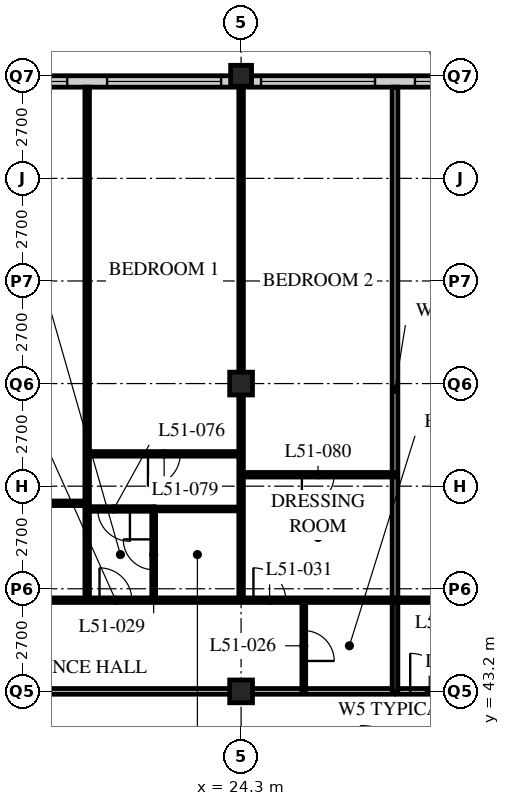
"""IFC4 building model, lengths in metres.
Left out: names, types, materials, properties, quantities, classifications, styles, units other than length and angle.
Written with IfcOpenShell. Run it as: python <this file> out.ifc"""

import sys

from ifc_helpers import new_model, si_unit, direction, frame, frame_2d, origin, origin_2d, place, context, subcontext, project, spatial, rectangle, hollow_rectangle, extrude, element, fill, save


model = new_model("IFC4")
c1 = context("Model", 3, precision=1e-05, world=origin(), true_north=direction((0.0, 1.0)))
c2 = subcontext(c1, "Body", "Model", "MODEL_VIEW")
j1 = project(units=[si_unit("LENGTHUNIT", "METRE"), si_unit("PLANEANGLEUNIT", "RADIAN")], contexts=[c1])
p1 = place(None, origin())
s1 = spatial("IfcSite", under=j1, at=p1, CompositionType="ELEMENT")
p2 = place(p1, origin())
s2 = spatial("IfcBuilding", under=s1, at=p2, CompositionType="ELEMENT")
p3 = place(p2, frame((0.0, 0.0, 199.2)))
s3 = spatial("IfcBuildingStorey", under=s2, at=p3, CompositionType="ELEMENT", Elevation=199.2)
for number, where, z_axis, x_axis in (
    (1, (24.3, 43.2, 0.0), (0.0, 0.0, 1.0), (1.0, 0.0, 0.0)),
    (2, (24.3, 51.3, 0.0), (0.0, 0.0, 1.0), (1.0, 0.0, 0.0)),
):
    element("IfcColumn", number, at=place(p3, frame(where, z_axis=z_axis, x_axis=x_axis)), inside=s3, PredefinedType="COLUMN", context=c2, shape_type="SweptSolid", body=[
        extrude(hollow_rectangle(XDim=0.6, YDim=0.6, WallThickness=0.05, at=origin_2d()), origin(), (0.0, 0.0, 1.0), 3.6),
    ])
p4 = place(p3, frame((24.3, 59.4, 0.0), z_axis=(0.0, 0.0, 1.0), x_axis=(1.0, 0.0, 0.0)))
e3 = element("IfcColumn", 3, at=p4, inside=s3, PredefinedType="COLUMN", context=c2, shape_type="SweptSolid", body=[
    extrude(hollow_rectangle(XDim=0.55, YDim=0.55, WallThickness=0.045, at=origin_2d()), origin(), (0.0, 0.0, 1.0), 3.6),
])
p5 = place(p3, frame((48.3, 59.25, 0.0), z_axis=(0.0, 0.0, 1.0), x_axis=(-1.0, 0.0, 0.0)))
e4 = element("IfcWall", 4, at=p5, inside=s3, PredefinedType="SOLIDWALL", context=c2, shape_type="SweptSolid", body=[
    extrude(rectangle(XDim=40.2, YDim=0.3, at=frame_2d((20.1, 0.0))), origin(), (0.0, 0.0, 1.0), 3.39),
])
p6 = place(p5, frame((0.225, 0.0, 0.6)))
e5 = element("IfcOpeningElement", 5, at=p6, cuts=e4, PredefinedType="OPENING", context=c2, shape_type="SweptSolid", body=[
    extrude(rectangle(XDim=3.0, YDim=2.4, at=frame_2d((1.5, 1.2))), frame((0.0, 0.16, 0.0), z_axis=(0.0, -1.0, 0.0), x_axis=(1.0, 0.0, 0.0)), (0.0, 0.0, 1.0), 0.32),
])
p7 = place(p5, frame((4.275, 0.0, 0.6)))
e6 = element("IfcOpeningElement", 6, at=p7, cuts=e4, PredefinedType="OPENING", context=c2, shape_type="SweptSolid", body=[
    extrude(rectangle(XDim=3.0, YDim=2.4, at=frame_2d((1.5, 1.2))), frame((0.0, 0.16, 0.0), z_axis=(0.0, -1.0, 0.0), x_axis=(1.0, 0.0, 0.0)), (0.0, 0.0, 1.0), 0.32),
])
p8 = place(p5, frame((8.325, 0.0, 0.6)))
e7 = element("IfcOpeningElement", 7, at=p8, cuts=e4, PredefinedType="OPENING", context=c2, shape_type="SweptSolid", body=[
    extrude(rectangle(XDim=3.0, YDim=2.4, at=frame_2d((1.5, 1.2))), frame((0.0, 0.16, 0.0), z_axis=(0.0, -1.0, 0.0), x_axis=(1.0, 0.0, 0.0)), (0.0, 0.0, 1.0), 0.32),
])
p9 = place(p5, frame((12.375, 0.0, 0.6)))
e8 = element("IfcOpeningElement", 8, at=p9, cuts=e4, PredefinedType="OPENING", context=c2, shape_type="SweptSolid", body=[
    extrude(rectangle(XDim=3.0, YDim=2.4, at=frame_2d((1.5, 1.2))), frame((0.0, 0.16, 0.0), z_axis=(0.0, -1.0, 0.0), x_axis=(1.0, 0.0, 0.0)), (0.0, 0.0, 1.0), 0.32),
])
p10 = place(p5, frame((16.425, 0.0, 0.6)))
e9 = element("IfcOpeningElement", 9, at=p10, cuts=e4, PredefinedType="OPENING", context=c2, shape_type="SweptSolid", body=[
    extrude(rectangle(XDim=3.0, YDim=2.4, at=frame_2d((1.5, 1.2))), frame((0.0, 0.16, 0.0), z_axis=(0.0, -1.0, 0.0), x_axis=(1.0, 0.0, 0.0)), (0.0, 0.0, 1.0), 0.32),
])
p11 = place(p5, frame((20.475, 0.0, 0.6)))
e10 = element("IfcOpeningElement", 10, at=p11, cuts=e4, PredefinedType="OPENING", context=c2, shape_type="SweptSolid", body=[
    extrude(rectangle(XDim=3.0, YDim=2.4, at=frame_2d((1.5, 1.2))), frame((0.0, 0.16, 0.0), z_axis=(0.0, -1.0, 0.0), x_axis=(1.0, 0.0, 0.0)), (0.0, 0.0, 1.0), 0.32),
])
p12 = place(p5, frame((24.525, 0.0, 0.6)))
e11 = element("IfcOpeningElement", 11, at=p12, cuts=e4, PredefinedType="OPENING", context=c2, shape_type="SweptSolid", body=[
    extrude(rectangle(XDim=3.0, YDim=2.4, at=frame_2d((1.5, 1.2))), frame((0.0, 0.16, 0.0), z_axis=(0.0, -1.0, 0.0), x_axis=(1.0, 0.0, 0.0)), (0.0, 0.0, 1.0), 0.32),
])
p13 = place(p5, frame((28.575, 0.0, 0.6)))
e12 = element("IfcOpeningElement", 12, at=p13, cuts=e4, PredefinedType="OPENING", context=c2, shape_type="SweptSolid", body=[
    extrude(rectangle(XDim=3.0, YDim=2.4, at=frame_2d((1.5, 1.2))), frame((0.0, 0.16, 0.0), z_axis=(0.0, -1.0, 0.0), x_axis=(1.0, 0.0, 0.0)), (0.0, 0.0, 1.0), 0.32),
])
p14 = place(p5, frame((32.625, 0.0, 0.6)))
e13 = element("IfcOpeningElement", 13, at=p14, cuts=e4, PredefinedType="OPENING", context=c2, shape_type="SweptSolid", body=[
    extrude(rectangle(XDim=3.0, YDim=2.4, at=frame_2d((1.5, 1.2))), frame((0.0, 0.16, 0.0), z_axis=(0.0, -1.0, 0.0), x_axis=(1.0, 0.0, 0.0)), (0.0, 0.0, 1.0), 0.32),
])
p15 = place(p5, frame((36.675, 0.0, 0.6)))
e14 = element("IfcOpeningElement", 14, at=p15, cuts=e4, PredefinedType="OPENING", context=c2, shape_type="SweptSolid", body=[
    extrude(rectangle(XDim=3.0, YDim=2.4, at=frame_2d((1.5, 1.2))), frame((0.0, 0.16, 0.0), z_axis=(0.0, -1.0, 0.0), x_axis=(1.0, 0.0, 0.0)), (0.0, 0.0, 1.0), 0.32),
])
p16 = place(p3, frame((8.1, 43.2, 0.0), z_axis=(0.0, 0.0, 1.0), x_axis=(1.0, 0.0, 0.0)))
e15 = element("IfcWall", 15, at=p16, inside=s3, PredefinedType="PARTITIONING", context=c2, shape_type="SweptSolid", body=[
    extrude(rectangle(XDim=40.5, YDim=0.15, at=frame_2d((20.25, 0.0))), origin(), (0.0, 0.0, 1.0), 2.778),
])
p17 = place(p16, frame((4.45, 0.0, 0.0)))
e16 = element("IfcOpeningElement", 16, at=p17, cuts=e15, PredefinedType="OPENING", context=c2, shape_type="SweptSolid", body=[
    extrude(rectangle(XDim=1.0, YDim=2.1, at=frame_2d((0.5, 1.05))), frame((0.0, 0.085, 0.0), z_axis=(0.0, -1.0, 0.0), x_axis=(1.0, 0.0, 0.0)), (0.0, 0.0, 1.0), 0.17),
])
p18 = place(p16, frame((20.65, 0.0, 0.0)))
e17 = element("IfcOpeningElement", 17, at=p18, cuts=e15, PredefinedType="OPENING", context=c2, shape_type="SweptSolid", body=[
    extrude(rectangle(XDim=1.0, YDim=2.1, at=frame_2d((0.5, 1.05))), frame((0.0, 0.085, 0.0), z_axis=(0.0, -1.0, 0.0), x_axis=(1.0, 0.0, 0.0)), (0.0, 0.0, 1.0), 0.17),
])
p19 = place(p16, frame((28.75, 0.0, 0.0)))
e18 = element("IfcOpeningElement", 18, at=p19, cuts=e15, PredefinedType="OPENING", context=c2, shape_type="SweptSolid", body=[
    extrude(rectangle(XDim=1.0, YDim=2.1, at=frame_2d((0.5, 1.05))), frame((0.0, 0.085, 0.0), z_axis=(0.0, -1.0, 0.0), x_axis=(1.0, 0.0, 0.0)), (0.0, 0.0, 1.0), 0.17),
])
p20 = place(p16, frame((37.975, 0.0, 0.0)))
e19 = element("IfcOpeningElement", 19, at=p20, cuts=e15, PredefinedType="OPENING", context=c2, shape_type="SweptSolid", body=[
    extrude(rectangle(XDim=1.0, YDim=2.1, at=frame_2d((0.5, 1.05))), frame((0.0, 0.085, 0.0), z_axis=(0.0, -1.0, 0.0), x_axis=(1.0, 0.0, 0.0)), (0.0, 0.0, 1.0), 0.17),
])
p21 = place(p16, frame((1.525, 0.0, 0.0)))
e20 = element("IfcOpeningElement", 20, at=p21, cuts=e15, PredefinedType="OPENING", context=c2, shape_type="SweptSolid", body=[
    extrude(rectangle(XDim=1.0, YDim=2.1, at=frame_2d((0.5, 1.05))), frame((0.0, 0.085, 0.0), z_axis=(0.0, -1.0, 0.0), x_axis=(1.0, 0.0, 0.0)), (0.0, 0.0, 1.0), 0.17),
])
p22 = place(p3, frame((25.95, 43.2, 0.0), z_axis=(0.0, 0.0, 1.0), x_axis=(0.0, 1.0, 0.0)))
e21 = element("IfcWall", 21, at=p22, inside=s3, PredefinedType="PARTITIONING", context=c2, shape_type="SweptSolid", body=[
    extrude(rectangle(XDim=2.4, YDim=0.1, at=frame_2d((1.2, 0.0))), origin(), (0.0, 0.0, 1.0), 3.39),
])
p23 = place(p22, frame((0.8, 0.0, 0.0)))
e22 = element("IfcOpeningElement", 22, at=p23, cuts=e21, PredefinedType="OPENING", context=c2, shape_type="SweptSolid", body=[
    extrude(rectangle(XDim=0.8, YDim=2.1, at=frame_2d((0.4, 1.05))), frame((0.0, 0.06, 0.0), z_axis=(0.0, -1.0, 0.0), x_axis=(1.0, 0.0, 0.0)), (0.0, 0.0, 1.0), 0.12),
])
p24 = place(p3, frame((22.0, 45.6, 0.0), z_axis=(0.0, 0.0, 1.0), x_axis=(0.0, 1.0, 0.0)))
e23 = element("IfcWall", 23, at=p24, inside=s3, PredefinedType="PARTITIONING", context=c2, shape_type="SweptSolid", body=[
    extrude(rectangle(XDim=2.4, YDim=0.1, at=frame_2d((1.2, 0.0))), origin(), (0.0, 0.0, 1.0), 3.39),
])
p25 = place(p24, frame((0.8, 0.0, 0.0)))
e24 = element("IfcOpeningElement", 24, at=p25, cuts=e23, PredefinedType="OPENING", context=c2, shape_type="SweptSolid", body=[
    extrude(rectangle(XDim=0.8, YDim=2.1, at=frame_2d((0.4, 1.05))), frame((0.0, 0.06, 0.0), z_axis=(0.0, -1.0, 0.0), x_axis=(1.0, 0.0, 0.0)), (0.0, 0.0, 1.0), 0.12),
])
p26 = place(p3, frame((22.0, 48.0, 0.0), z_axis=(0.0, 0.0, 1.0), x_axis=(1.0, 0.0, 0.0)))
e25 = element("IfcWall", 25, at=p26, inside=s3, PredefinedType="PARTITIONING", context=c2, shape_type="SweptSolid", body=[
    extrude(rectangle(XDim=2.3, YDim=0.1, at=frame_2d((1.15, 0.0))), origin(), (0.0, 0.0, 1.0), 3.39),
])
p27 = place(p3, frame((20.25, 45.6, 0.0), z_axis=(0.0, 0.0, 1.0), x_axis=(0.0, 1.0, 0.0)))
e26 = element("IfcWall", 26, at=p27, inside=s3, PredefinedType="PARTITIONING", context=c2, shape_type="SweptSolid", body=[
    extrude(rectangle(XDim=13.5, YDim=0.12, at=frame_2d((6.75, 0.0))), origin(), (0.0, 0.0, 1.0), 3.39),
])
p28 = place(p3, frame((24.3, 45.6, 0.0), z_axis=(0.0, 0.0, 1.0), x_axis=(0.0, 1.0, 0.0)))
e27 = element("IfcWall", 27, at=p28, inside=s3, PredefinedType="PARTITIONING", context=c2, shape_type="SweptSolid", body=[
    extrude(rectangle(XDim=13.5, YDim=0.12, at=frame_2d((6.75, 0.0))), origin(), (0.0, 0.0, 1.0), 2.778),
])
p29 = place(p3, frame((28.35, 43.2, 0.0), z_axis=(0.0, 0.0, 1.0), x_axis=(0.0, 1.0, 0.0)))
e28 = element("IfcWall", 28, at=p29, inside=s3, PredefinedType="PARTITIONING", context=c2, shape_type="SweptSolid", body=[
    extrude(rectangle(XDim=15.9, YDim=0.15, at=frame_2d((7.95, 0.0))), origin(), (0.0, 0.0, 1.0), 3.39),
])
p30 = place(p3, frame((4.1, 45.6, 0.0), z_axis=(0.0, 0.0, 1.0), x_axis=(1.0, 0.0, 0.0)))
e29 = element("IfcWall", 29, at=p30, inside=s3, PredefinedType="PARTITIONING", context=c2, shape_type="SweptSolid", body=[
    extrude(rectangle(XDim=48.5, YDim=0.12, at=frame_2d((24.25, 0.0))), origin(), (0.0, 0.0, 1.0), 3.39),
])
p31 = place(p30, frame((9.025, 0.0, 0.0)))
e30 = element("IfcOpeningElement", 30, at=p31, cuts=e29, PredefinedType="OPENING", context=c2, shape_type="SweptSolid", body=[
    extrude(rectangle(XDim=0.85, YDim=2.1, at=frame_2d((0.425, 1.05))), frame((0.0, 0.07, 0.0), z_axis=(0.0, -1.0, 0.0), x_axis=(1.0, 0.0, 0.0)), (0.0, 0.0, 1.0), 0.14),
])
p32 = place(p30, frame((16.475, 0.0, 0.0)))
e31 = element("IfcOpeningElement", 31, at=p32, cuts=e29, PredefinedType="OPENING", context=c2, shape_type="SweptSolid", body=[
    extrude(rectangle(XDim=0.85, YDim=2.1, at=frame_2d((0.425, 1.05))), frame((0.0, 0.07, 0.0), z_axis=(0.0, -1.0, 0.0), x_axis=(1.0, 0.0, 0.0)), (0.0, 0.0, 1.0), 0.14),
])
p33 = place(p30, frame((20.525, 0.0, 0.0)))
e32 = element("IfcOpeningElement", 32, at=p33, cuts=e29, PredefinedType="OPENING", context=c2, shape_type="SweptSolid", body=[
    extrude(rectangle(XDim=0.85, YDim=2.1, at=frame_2d((0.425, 1.05))), frame((0.0, 0.07, 0.0), z_axis=(0.0, -1.0, 0.0), x_axis=(1.0, 0.0, 0.0)), (0.0, 0.0, 1.0), 0.14),
])
p34 = place(p30, frame((25.225, 0.0, 0.0)))
e33 = element("IfcOpeningElement", 33, at=p34, cuts=e29, PredefinedType="OPENING", context=c2, shape_type="SweptSolid", body=[
    extrude(rectangle(XDim=0.85, YDim=2.1, at=frame_2d((0.425, 1.05))), frame((0.0, 0.07, 0.0), z_axis=(0.0, -1.0, 0.0), x_axis=(1.0, 0.0, 0.0)), (0.0, 0.0, 1.0), 0.14),
])
p35 = place(p30, frame((28.625, 0.0, 0.0)))
e34 = element("IfcOpeningElement", 34, at=p35, cuts=e29, PredefinedType="OPENING", context=c2, shape_type="SweptSolid", body=[
    extrude(rectangle(XDim=0.85, YDim=2.1, at=frame_2d((0.425, 1.05))), frame((0.0, 0.07, 0.0), z_axis=(0.0, -1.0, 0.0), x_axis=(1.0, 0.0, 0.0)), (0.0, 0.0, 1.0), 0.14),
])
p36 = place(p30, frame((33.325, 0.0, 0.0)))
e35 = element("IfcOpeningElement", 35, at=p36, cuts=e29, PredefinedType="OPENING", context=c2, shape_type="SweptSolid", body=[
    extrude(rectangle(XDim=0.85, YDim=2.1, at=frame_2d((0.425, 1.05))), frame((0.0, 0.07, 0.0), z_axis=(0.0, -1.0, 0.0), x_axis=(1.0, 0.0, 0.0)), (0.0, 0.0, 1.0), 0.14),
])
p37 = place(p30, frame((36.725, 0.0, 0.0)))
e36 = element("IfcOpeningElement", 36, at=p37, cuts=e29, PredefinedType="OPENING", context=c2, shape_type="SweptSolid", body=[
    extrude(rectangle(XDim=0.85, YDim=2.1, at=frame_2d((0.425, 1.05))), frame((0.0, 0.07, 0.0), z_axis=(0.0, -1.0, 0.0), x_axis=(1.0, 0.0, 0.0)), (0.0, 0.0, 1.0), 0.14),
])
p38 = place(p30, frame((40.925, 0.0, 0.0)))
e37 = element("IfcOpeningElement", 37, at=p38, cuts=e29, PredefinedType="OPENING", context=c2, shape_type="SweptSolid", body=[
    extrude(rectangle(XDim=0.85, YDim=2.1, at=frame_2d((0.425, 1.05))), frame((0.0, 0.07, 0.0), z_axis=(0.0, -1.0, 0.0), x_axis=(1.0, 0.0, 0.0)), (0.0, 0.0, 1.0), 0.14),
])
p39 = place(p30, frame((44.775, 0.0, 0.0)))
e38 = element("IfcOpeningElement", 38, at=p39, cuts=e29, PredefinedType="OPENING", context=c2, shape_type="SweptSolid", body=[
    extrude(rectangle(XDim=0.85, YDim=2.1, at=frame_2d((0.425, 1.05))), frame((0.0, 0.07, 0.0), z_axis=(0.0, -1.0, 0.0), x_axis=(1.0, 0.0, 0.0)), (0.0, 0.0, 1.0), 0.14),
])
p40 = place(p30, frame((6.725, 0.0, 0.0)))
e39 = element("IfcOpeningElement", 39, at=p40, cuts=e29, PredefinedType="OPENING", context=c2, shape_type="SweptSolid", body=[
    extrude(rectangle(XDim=0.85, YDim=2.1, at=frame_2d((0.425, 1.05))), frame((0.0, 0.07, 0.0), z_axis=(0.0, -1.0, 0.0), x_axis=(1.0, 0.0, 0.0)), (0.0, 0.0, 1.0), 0.14),
])
p41 = place(p30, frame((2.875, 0.0, 0.0)))
e40 = element("IfcOpeningElement", 40, at=p41, cuts=e29, PredefinedType="OPENING", context=c2, shape_type="SweptSolid", body=[
    extrude(rectangle(XDim=0.85, YDim=2.1, at=frame_2d((0.425, 1.05))), frame((0.0, 0.07, 0.0), z_axis=(0.0, -1.0, 0.0), x_axis=(1.0, 0.0, 0.0)), (0.0, 0.0, 1.0), 0.14),
])
p42 = place(p3, frame((20.25, 48.0, 0.0), z_axis=(0.0, 0.0, 1.0), x_axis=(1.0, 0.0, 0.0)))
e41 = element("IfcWall", 41, at=p42, inside=s3, PredefinedType="PARTITIONING", context=c2, shape_type="SweptSolid", body=[
    extrude(rectangle(XDim=1.76, YDim=0.12, at=frame_2d((0.88, 0.0))), origin(), (0.0, 0.0, 1.0), 3.39),
])
p43 = place(p42, frame((0.275, 0.0, 0.0)))
e42 = element("IfcOpeningElement", 42, at=p43, cuts=e41, PredefinedType="OPENING", context=c2, shape_type="SweptSolid", body=[
    extrude(rectangle(XDim=0.85, YDim=2.1, at=frame_2d((0.425, 1.05))), frame((0.0, 0.07, 0.0), z_axis=(0.0, -1.0, 0.0), x_axis=(1.0, 0.0, 0.0)), (0.0, 0.0, 1.0), 0.14),
])
p44 = place(p3, frame((12.15, 48.15, 0.0), z_axis=(0.0, 0.0, 1.0), x_axis=(1.0, 0.0, 0.0)))
e43 = element("IfcWall", 43, at=p44, inside=s3, PredefinedType="PARTITIONING", context=c2, shape_type="SweptSolid", body=[
    extrude(rectangle(XDim=8.1, YDim=0.12, at=frame_2d((4.05, 0.0))), origin(), (0.0, 0.0, 1.0), 3.39),
])
p45 = place(p44, frame((1.575, 0.0, 0.0)))
e44 = element("IfcOpeningElement", 44, at=p45, cuts=e43, PredefinedType="OPENING", context=c2, shape_type="SweptSolid", body=[
    extrude(rectangle(XDim=0.85, YDim=2.1, at=frame_2d((0.425, 1.05))), frame((0.0, 0.07, 0.0), z_axis=(0.0, -1.0, 0.0), x_axis=(1.0, 0.0, 0.0)), (0.0, 0.0, 1.0), 0.14),
])
p46 = place(p3, frame((20.25, 49.45, 0.0), z_axis=(0.0, 0.0, 1.0), x_axis=(1.0, 0.0, 0.0)))
e45 = element("IfcWall", 45, at=p46, inside=s3, PredefinedType="PARTITIONING", context=c2, shape_type="SweptSolid", body=[
    extrude(rectangle(XDim=4.05, YDim=0.12, at=frame_2d((2.025, 0.0))), origin(), (0.0, 0.0, 1.0), 3.39),
])
p47 = place(p46, frame((1.6, 0.0, 0.0)))
e46 = element("IfcOpeningElement", 46, at=p47, cuts=e45, PredefinedType="OPENING", context=c2, shape_type="SweptSolid", body=[
    extrude(rectangle(XDim=0.85, YDim=2.1, at=frame_2d((0.425, 1.05))), frame((0.0, 0.07, 0.0), z_axis=(0.0, -1.0, 0.0), x_axis=(1.0, 0.0, 0.0)), (0.0, 0.0, 1.0), 0.14),
])
p48 = place(p3, frame((24.3, 48.9, 0.0), z_axis=(0.0, 0.0, 1.0), x_axis=(1.0, 0.0, 0.0)))
e47 = element("IfcWall", 47, at=p48, inside=s3, PredefinedType="PARTITIONING", context=c2, shape_type="SweptSolid", body=[
    extrude(rectangle(XDim=4.05, YDim=0.12, at=frame_2d((2.025, 0.0))), origin(), (0.0, 0.0, 1.0), 3.39),
])
p49 = place(p48, frame((1.6, 0.0, 0.0)))
e48 = element("IfcOpeningElement", 48, at=p49, cuts=e47, PredefinedType="OPENING", context=c2, shape_type="SweptSolid", body=[
    extrude(rectangle(XDim=0.85, YDim=2.1, at=frame_2d((0.425, 1.05))), frame((0.0, 0.07, 0.0), z_axis=(0.0, -1.0, 0.0), x_axis=(1.0, 0.0, 0.0)), (0.0, 0.0, 1.0), 0.14),
])
p50 = place(p10, origin())
e49 = element("IfcWindow", 49, at=p50, inside=s3, PartitioningType="SINGLE_PANEL", PredefinedType="WINDOW", context=c2, shape_type="SweptSolid", body=[
    extrude(rectangle(XDim=3.0, YDim=2.4, at=frame_2d((1.5, 1.2))), frame((0.0, 0.03, 0.0), z_axis=(0.0, -1.0, 0.0), x_axis=(1.0, 0.0, 0.0)), (0.0, 0.0, 1.0), 0.06),
])
fill(e9, e49)
p51 = place(p11, origin())
e50 = element("IfcWindow", 50, at=p51, inside=s3, PartitioningType="SINGLE_PANEL", PredefinedType="WINDOW", context=c2, shape_type="SweptSolid", body=[
    extrude(rectangle(XDim=3.0, YDim=2.4, at=frame_2d((1.5, 1.2))), frame((0.0, 0.03, 0.0), z_axis=(0.0, -1.0, 0.0), x_axis=(1.0, 0.0, 0.0)), (0.0, 0.0, 1.0), 0.06),
])
fill(e10, e50)
p52 = place(p12, origin())
e51 = element("IfcWindow", 51, at=p52, inside=s3, PartitioningType="SINGLE_PANEL", PredefinedType="WINDOW", context=c2, shape_type="SweptSolid", body=[
    extrude(rectangle(XDim=3.0, YDim=2.4, at=frame_2d((1.5, 1.2))), frame((0.0, 0.03, 0.0), z_axis=(0.0, -1.0, 0.0), x_axis=(1.0, 0.0, 0.0)), (0.0, 0.0, 1.0), 0.06),
])
fill(e11, e51)
p53 = place(p13, origin())
e52 = element("IfcWindow", 52, at=p53, inside=s3, PartitioningType="SINGLE_PANEL", PredefinedType="WINDOW", context=c2, shape_type="SweptSolid", body=[
    extrude(rectangle(XDim=3.0, YDim=2.4, at=frame_2d((1.5, 1.2))), frame((0.0, 0.03, 0.0), z_axis=(0.0, -1.0, 0.0), x_axis=(1.0, 0.0, 0.0)), (0.0, 0.0, 1.0), 0.06),
])
fill(e12, e52)
p54 = place(p23, origin())
e53 = element("IfcDoor", 53, at=p54, inside=s3, OperationType="SINGLE_SWING_RIGHT", PredefinedType="DOOR", context=c2, shape_type="SweptSolid", body=[
    extrude(rectangle(XDim=0.8, YDim=2.1, at=frame_2d((0.4, 1.05))), frame((0.0, 0.025, 0.0), z_axis=(0.0, -1.0, 0.0), x_axis=(1.0, 0.0, 0.0)), (0.0, 0.0, 1.0), 0.05),
])
fill(e22, e53)
p55 = place(p25, origin())
e54 = element("IfcDoor", 54, at=p55, inside=s3, OperationType="SINGLE_SWING_RIGHT", PredefinedType="DOOR", context=c2, shape_type="SweptSolid", body=[
    extrude(rectangle(XDim=0.8, YDim=2.1, at=frame_2d((0.4, 1.05))), frame((0.0, 0.025, 0.0), z_axis=(0.0, -1.0, 0.0), x_axis=(1.0, 0.0, 0.0)), (0.0, 0.0, 1.0), 0.05),
])
fill(e24, e54)
p56 = place(p32, origin())
e55 = element("IfcDoor", 55, at=p56, inside=s3, OperationType="SINGLE_SWING_LEFT", PredefinedType="DOOR", context=c2, shape_type="SweptSolid", body=[
    extrude(rectangle(XDim=0.85, YDim=2.1, at=frame_2d((0.425, 1.05))), frame((0.0, 0.025, 0.0), z_axis=(0.0, -1.0, 0.0), x_axis=(1.0, 0.0, 0.0)), (0.0, 0.0, 1.0), 0.05),
])
fill(e31, e55)
p57 = place(p33, origin())
e56 = element("IfcDoor", 56, at=p57, inside=s3, OperationType="SINGLE_SWING_LEFT", PredefinedType="DOOR", context=c2, shape_type="SweptSolid", body=[
    extrude(rectangle(XDim=0.85, YDim=2.1, at=frame_2d((0.425, 1.05))), frame((0.0, 0.025, 0.0), z_axis=(0.0, -1.0, 0.0), x_axis=(1.0, 0.0, 0.0)), (0.0, 0.0, 1.0), 0.05),
])
fill(e32, e56)
p58 = place(p18, origin())
e57 = element("IfcDoor", 57, at=p58, inside=s3, OperationType="SINGLE_SWING_LEFT", PredefinedType="DOOR", context=c2, shape_type="SweptSolid", body=[
    extrude(rectangle(XDim=1.0, YDim=2.1, at=frame_2d((0.5, 1.05))), frame((0.0, 0.025, 0.0), z_axis=(0.0, -1.0, 0.0), x_axis=(1.0, 0.0, 0.0)), (0.0, 0.0, 1.0), 0.05),
])
fill(e17, e57)
p59 = place(p43, origin())
e58 = element("IfcDoor", 58, at=p59, inside=s3, OperationType="SINGLE_SWING_LEFT", PredefinedType="DOOR", context=c2, shape_type="SweptSolid", body=[
    extrude(rectangle(XDim=0.85, YDim=2.1, at=frame_2d((0.425, 1.05))), frame((0.0, 0.025, 0.0), z_axis=(0.0, -1.0, 0.0), x_axis=(1.0, 0.0, 0.0)), (0.0, 0.0, 1.0), 0.05),
])
fill(e42, e58)
p60 = place(p47, origin())
e59 = element("IfcDoor", 59, at=p60, inside=s3, OperationType="SINGLE_SWING_RIGHT", PredefinedType="DOOR", context=c2, shape_type="SweptSolid", body=[
    extrude(rectangle(XDim=0.85, YDim=2.1, at=frame_2d((0.425, 1.05))), frame((0.0, 0.025, 0.0), z_axis=(0.0, -1.0, 0.0), x_axis=(1.0, 0.0, 0.0)), (0.0, 0.0, 1.0), 0.05),
])
fill(e46, e59)
p61 = place(p49, origin())
e60 = element("IfcDoor", 60, at=p61, inside=s3, OperationType="SINGLE_SWING_RIGHT", PredefinedType="DOOR", context=c2, shape_type="SweptSolid", body=[
    extrude(rectangle(XDim=0.85, YDim=2.1, at=frame_2d((0.425, 1.05))), frame((0.0, 0.025, 0.0), z_axis=(0.0, -1.0, 0.0), x_axis=(1.0, 0.0, 0.0)), (0.0, 0.0, 1.0), 0.05),
])
fill(e48, e60)
save(model, sys.argv[1])
